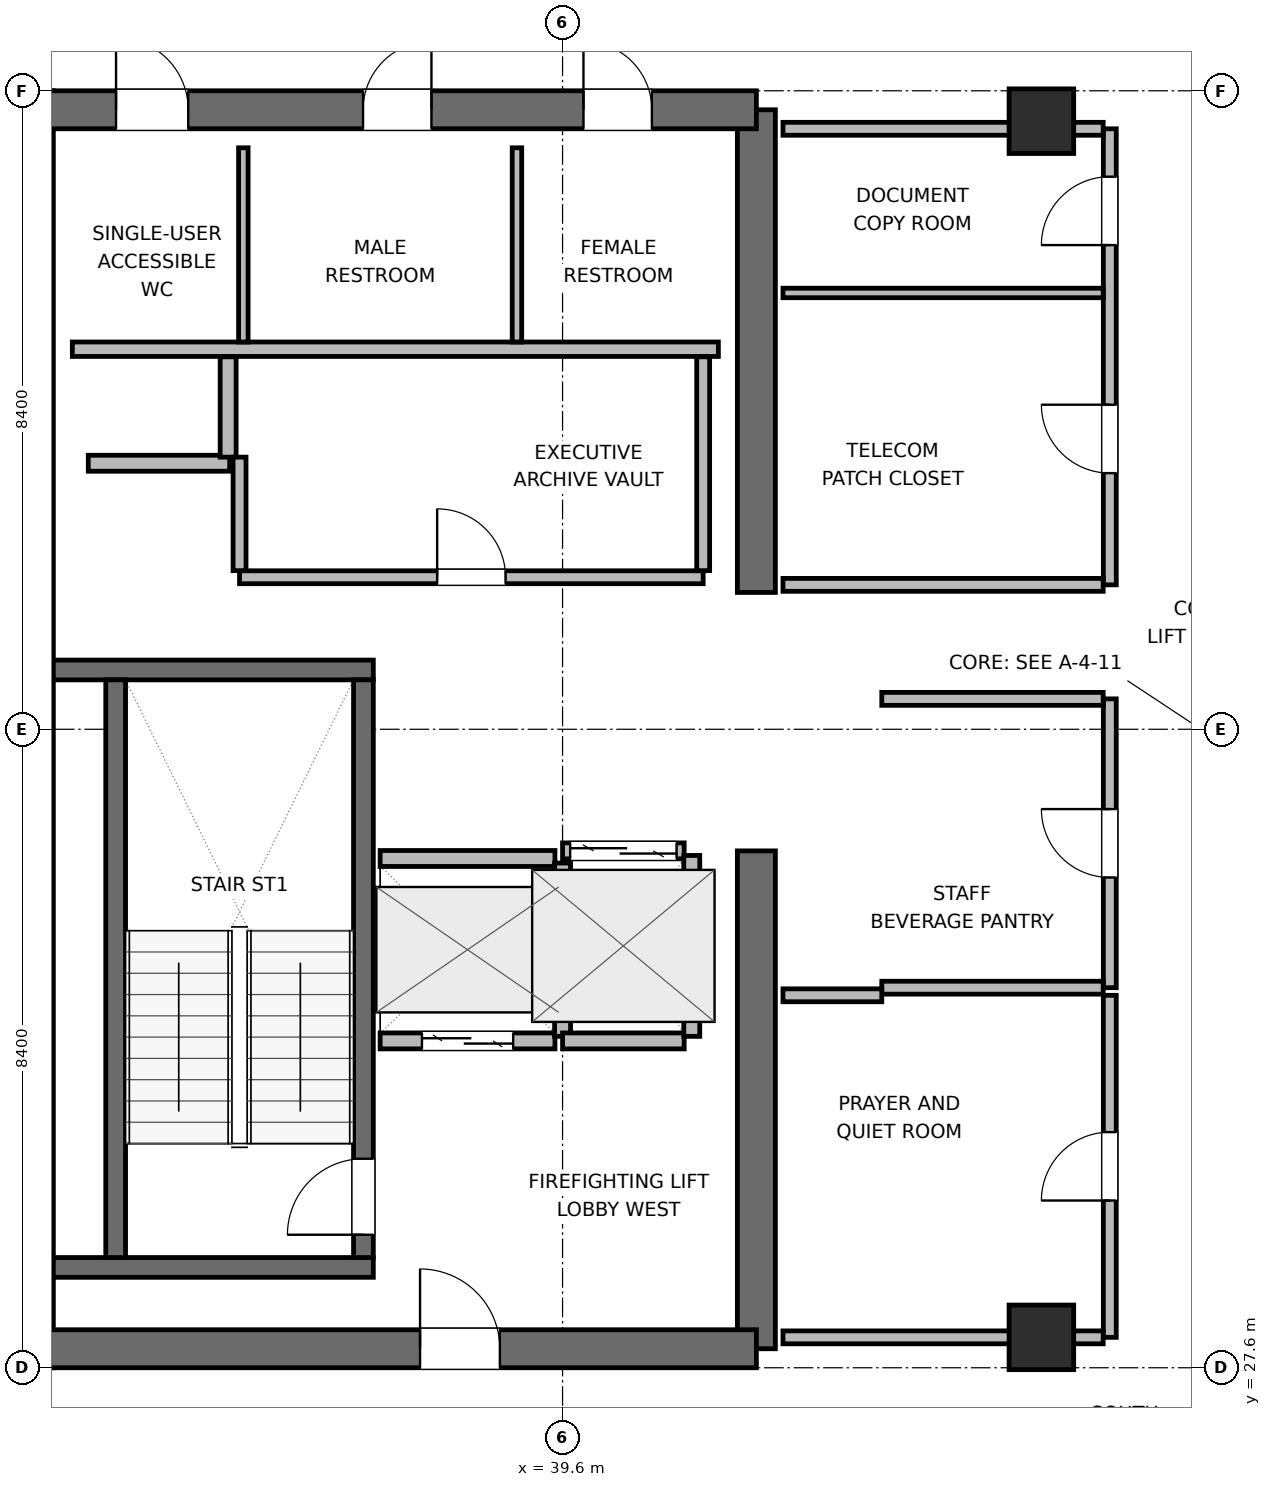
"""IFC4 building model, lengths in metres.
Left out: names, types, materials, properties, quantities, classifications, styles, units other than length and angle.
Written with IfcOpenShell. Run it as: python <this file> out.ifc"""

import sys

from ifc_helpers import new_model, si_unit, direction, frame, frame_2d, origin, origin_2d, place, context, subcontext, project, spatial, rectangle, extrude, element, fill, save


model = new_model("IFC4")
c1 = context("Model", 3, precision=1e-05, world=origin(), true_north=direction((0.0, 1.0)))
c2 = subcontext(c1, "Body", "Model", "MODEL_VIEW")
j1 = project(units=[si_unit("LENGTHUNIT", "METRE"), si_unit("PLANEANGLEUNIT", "RADIAN")], contexts=[c1])
p1 = place(None, origin())
s1 = spatial("IfcSite", under=j1, at=p1, CompositionType="ELEMENT")
p2 = place(p1, origin())
s2 = spatial("IfcBuilding", under=s1, at=p2, CompositionType="ELEMENT")
p3 = place(p2, frame((0.0, 0.0, 314.1)))
s3 = spatial("IfcBuildingStorey", under=s2, at=p3, CompositionType="ELEMENT", Elevation=314.1)
p4 = place(p3, frame((32.65, 27.6, 0.0), z_axis=(0.0, 0.0, 1.0), x_axis=(0.0, 1.0, 0.0)))
e1 = element("IfcWall", 1, at=p4, inside=s3, PredefinedType="SHEAR", context=c2, shape_type="SweptSolid", body=[
    extrude(rectangle(XDim=16.8, YDim=0.5, at=frame_2d((8.4, 0.0))), origin(), (0.0, 0.0, 1.0), 3.9),
])
p5 = place(p3, frame((42.15, 27.85, 0.0), z_axis=(0.0, 0.0, 1.0), x_axis=(0.0, 1.0, 0.0)))
e2 = element("IfcWall", 2, at=p5, inside=s3, PredefinedType="SHEAR", context=c2, shape_type="SweptSolid", body=[
    extrude(rectangle(XDim=6.55, YDim=0.5, at=frame_2d((3.275, 0.0))), origin(), (0.0, 0.0, 1.0), 3.9),
])
p6 = place(p3, frame((42.15, 37.8, 0.0), z_axis=(0.0, 0.0, 1.0), x_axis=(0.0, 1.0, 0.0)))
e3 = element("IfcWall", 3, at=p6, inside=s3, PredefinedType="SHEAR", context=c2, shape_type="SweptSolid", body=[
    extrude(rectangle(XDim=6.35, YDim=0.5, at=frame_2d((3.175, 0.0))), origin(), (0.0, 0.0, 1.0), 3.9),
])
p7 = place(p3, frame((32.65, 27.85, 0.0), z_axis=(0.0, 0.0, 1.0), x_axis=(1.0, 0.0, 0.0)))
e4 = element("IfcWall", 4, at=p7, inside=s3, PredefinedType="SHEAR", context=c2, shape_type="SweptSolid", body=[
    extrude(rectangle(XDim=9.5, YDim=0.5, at=frame_2d((4.75, 0.0))), origin(), (0.0, 0.0, 1.0), 3.9),
])
p8 = place(p7, frame((5.075, 0.0, 0.0)))
e5 = element("IfcOpeningElement", 5, at=p8, cuts=e4, PredefinedType="OPENING", context=c2, shape_type="SweptSolid", body=[
    extrude(rectangle(XDim=1.05, YDim=2.04, at=frame_2d((0.525, 1.02))), frame((0.0, 0.26, 0.0), z_axis=(0.0, -1.0, 0.0), x_axis=(1.0, 0.0, 0.0)), (0.0, 0.0, 1.0), 0.52),
])
p9 = place(p3, frame((32.65, 44.15, 0.0), z_axis=(0.0, 0.0, 1.0), x_axis=(1.0, 0.0, 0.0)))
e6 = element("IfcWall", 6, at=p9, inside=s3, PredefinedType="SHEAR", context=c2, shape_type="SweptSolid", body=[
    extrude(rectangle(XDim=9.5, YDim=0.5, at=frame_2d((4.75, 0.0))), origin(), (0.0, 0.0, 1.0), 3.9),
])
p10 = place(p9, frame((1.075, 0.0, 0.0)))
e7 = element("IfcOpeningElement", 7, at=p10, cuts=e6, PredefinedType="OPENING", context=c2, shape_type="SweptSolid", body=[
    extrude(rectangle(XDim=0.95, YDim=2.04, at=frame_2d((0.475, 1.02))), frame((0.0, 0.26, 0.0), z_axis=(0.0, -1.0, 0.0), x_axis=(1.0, 0.0, 0.0)), (0.0, 0.0, 1.0), 0.52),
])
p11 = place(p9, frame((4.325, 0.0, 0.0)))
e8 = element("IfcOpeningElement", 8, at=p11, cuts=e6, PredefinedType="OPENING", context=c2, shape_type="SweptSolid", body=[
    extrude(rectangle(XDim=0.9, YDim=2.02, at=frame_2d((0.45, 1.01))), frame((0.0, 0.26, 0.0), z_axis=(0.0, -1.0, 0.0), x_axis=(1.0, 0.0, 0.0)), (0.0, 0.0, 1.0), 0.52),
])
p12 = place(p9, frame((7.225, 0.0, 0.0)))
e9 = element("IfcOpeningElement", 9, at=p12, cuts=e6, PredefinedType="OPENING", context=c2, shape_type="SweptSolid", body=[
    extrude(rectangle(XDim=0.9, YDim=2.02, at=frame_2d((0.45, 1.01))), frame((0.0, 0.26, 0.0), z_axis=(0.0, -1.0, 0.0), x_axis=(1.0, 0.0, 0.0)), (0.0, 0.0, 1.0), 0.52),
])
for number, where, z_axis, x_axis in (
    (10, (32.9, 28.92, 0.0), (0.0, 0.0, 1.0), (1.0, 0.0, 0.0)),
    (11, (32.9, 36.78, 0.0), (0.0, 0.0, 1.0), (1.0, 0.0, 0.0)),
):
    element("IfcWall", number, at=place(p3, frame(where, z_axis=z_axis, x_axis=x_axis)), inside=s3, PredefinedType="SHEAR", context=c2, shape_type="SweptSolid", body=[
        extrude(rectangle(XDim=4.21, YDim=0.26, at=frame_2d((2.105, 0.0))), origin(), (0.0, 0.0, 1.0), 3.9),
    ])
p13 = place(p3, frame((33.72, 29.05, 0.0), z_axis=(0.0, 0.0, 1.0), x_axis=(0.0, 1.0, 0.0)))
e12 = element("IfcWall", 12, at=p13, inside=s3, PredefinedType="SHEAR", context=c2, shape_type="SweptSolid", body=[
    extrude(rectangle(XDim=7.6, YDim=0.26, at=frame_2d((3.8, 0.0))), origin(), (0.0, 0.0, 1.0), 3.9),
])
p14 = place(p3, frame((36.98, 29.05, 0.0), z_axis=(0.0, 0.0, 1.0), x_axis=(0.0, 1.0, 0.0)))
e13 = element("IfcWall", 13, at=p14, inside=s3, PredefinedType="SHEAR", context=c2, shape_type="SweptSolid", body=[
    extrude(rectangle(XDim=7.6, YDim=0.26, at=frame_2d((3.8, 0.0))), origin(), (0.0, 0.0, 1.0), 3.9),
])
p15 = place(p14, frame((0.3, 0.0, 0.0)))
e14 = element("IfcOpeningElement", 14, at=p15, cuts=e13, PredefinedType="OPENING", context=c2, shape_type="SweptSolid", body=[
    extrude(rectangle(XDim=1.0, YDim=2.04, at=frame_2d((0.5, 1.02))), frame((0.0, 0.14, 0.0), z_axis=(0.0, -1.0, 0.0), x_axis=(1.0, 0.0, 0.0)), (0.0, 0.0, 1.0), 0.28),
])
for number, where, z_axis, x_axis in (
    (15, (45.9, 28.0, 0.0), (0.0, 0.0, 1.0), (1.0, 0.0, 0.0)),
    (16, (45.9, 44.0, 0.0), (0.0, 0.0, 1.0), (1.0, 0.0, 0.0)),
):
    element("IfcColumn", number, at=place(p3, frame(where, z_axis=z_axis, x_axis=x_axis)), inside=s3, PredefinedType="COLUMN", context=c2, shape_type="SweptSolid", body=[
        extrude(rectangle(XDim=0.85, YDim=0.85, at=origin_2d()), origin(), (0.0, 0.0, 1.0), 3.9),
    ])
p16 = place(p3, frame((33.15, 41.0, 0.0), z_axis=(0.0, 0.0, 1.0), x_axis=(1.0, 0.0, 0.0)))
e17 = element("IfcWall", 17, at=p16, inside=s3, PredefinedType="PLUMBINGWALL", context=c2, shape_type="SweptSolid", body=[
    extrude(rectangle(XDim=8.5, YDim=0.19, at=frame_2d((4.25, 0.0))), origin(), (0.0, 0.0, 1.0), 3.68),
])
for number, where, z_axis, x_axis in (
    (18, (35.4, 41.095, 0.0), (0.0, 0.0, 1.0), (0.0, 1.0, 0.0)),
    (19, (39.0, 41.095, 0.0), (0.0, 0.0, 1.0), (0.0, 1.0, 0.0)),
):
    element("IfcWall", number, at=place(p3, frame(where, z_axis=z_axis, x_axis=x_axis)), inside=s3, PredefinedType="PARTITIONING", context=c2, shape_type="SweptSolid", body=[
        extrude(rectangle(XDim=2.555, YDim=0.125, at=frame_2d((1.277, 0.0))), origin(), (0.0, 0.0, 1.0), 3.68),
    ])
p17 = place(p3, frame((33.36, 39.5, 0.0), z_axis=(0.0, 0.0, 1.0), x_axis=(1.0, 0.0, 0.0)))
e20 = element("IfcWall", 20, at=p17, inside=s3, PredefinedType="PARTITIONING", context=c2, shape_type="SweptSolid", body=[
    extrude(rectangle(XDim=1.86, YDim=0.21, at=frame_2d((0.93, 0.0))), origin(), (0.0, 0.0, 1.0), 3.68),
])
p18 = place(p3, frame((35.2, 39.58, 0.0), z_axis=(0.0, 0.0, 1.0), x_axis=(0.0, 1.0, 0.0)))
e21 = element("IfcWall", 21, at=p18, inside=s3, PredefinedType="PARTITIONING", context=c2, shape_type="SweptSolid", body=[
    extrude(rectangle(XDim=1.32, YDim=0.21, at=frame_2d((0.66, 0.0))), origin(), (0.0, 0.0, 1.0), 3.68),
])
p19 = place(p3, frame((37.2, 31.9, 0.0), z_axis=(0.0, 0.0, 1.0), x_axis=(1.0, 0.0, 0.0)))
e22 = element("IfcWall", 22, at=p19, inside=s3, PredefinedType="PARTITIONING", context=c2, shape_type="SweptSolid", body=[
    extrude(rectangle(XDim=2.3, YDim=0.21, at=frame_2d((1.15, 0.0))), origin(), (0.0, 0.0, 1.0), 3.68),
])
p20 = place(p19, frame((0.55, 0.0, 0.0)))
e23 = element("IfcOpeningElement", 23, at=p20, cuts=e22, PredefinedType="OPENING", context=c2, shape_type="SweptSolid", body=[
    extrude(rectangle(XDim=1.2, YDim=2.04, at=frame_2d((0.6, 1.02))), frame((0.0, 0.115, 0.0), z_axis=(0.0, -1.0, 0.0), x_axis=(1.0, 0.0, 0.0)), (0.0, 0.0, 1.0), 0.23),
])
p21 = place(p3, frame((37.2, 34.3, 0.0), z_axis=(0.0, 0.0, 1.0), x_axis=(1.0, 0.0, 0.0)))
e24 = element("IfcWall", 24, at=p21, inside=s3, PredefinedType="PARTITIONING", context=c2, shape_type="SweptSolid", body=[
    extrude(rectangle(XDim=2.3, YDim=0.21, at=frame_2d((1.15, 0.0))), origin(), (0.0, 0.0, 1.0), 3.68),
])
p22 = place(p3, frame((39.6, 31.96, 0.0), z_axis=(0.0, 0.0, 1.0), x_axis=(0.0, 1.0, 0.0)))
e25 = element("IfcWall", 25, at=p22, inside=s3, PredefinedType="PARTITIONING", context=c2, shape_type="SweptSolid", body=[
    extrude(rectangle(XDim=2.28, YDim=0.21, at=frame_2d((1.14, 0.0))), origin(), (0.0, 0.0, 1.0), 3.68),
])
p23 = place(p3, frame((39.6, 34.4, 0.0), z_axis=(0.0, 0.0, 1.0), x_axis=(1.0, 0.0, 0.0)))
e26 = element("IfcWall", 26, at=p23, inside=s3, PredefinedType="PARTITIONING", context=c2, shape_type="SweptSolid", body=[
    extrude(rectangle(XDim=1.6, YDim=0.21, at=frame_2d((0.8, 0.0))), origin(), (0.0, 0.0, 1.0), 3.68),
])
p24 = place(p23, frame((0.1, 0.0, 0.0)))
e27 = element("IfcOpeningElement", 27, at=p24, cuts=e26, PredefinedType="OPENING", context=c2, shape_type="SweptSolid", body=[
    extrude(rectangle(XDim=1.4, YDim=2.06, at=frame_2d((0.7, 1.03))), frame((0.0, 0.115, 0.0), z_axis=(0.0, -1.0, 0.0), x_axis=(1.0, 0.0, 0.0)), (0.0, 0.0, 1.0), 0.23),
])
p25 = place(p3, frame((39.6, 31.9, 0.0), z_axis=(0.0, 0.0, 1.0), x_axis=(1.0, 0.0, 0.0)))
e28 = element("IfcWall", 28, at=p25, inside=s3, PredefinedType="PARTITIONING", context=c2, shape_type="SweptSolid", body=[
    extrude(rectangle(XDim=1.6, YDim=0.21, at=frame_2d((0.8, 0.0))), origin(), (0.0, 0.0, 1.0), 3.68),
])
p26 = place(p3, frame((41.3, 31.96, 0.0), z_axis=(0.0, 0.0, 1.0), x_axis=(0.0, 1.0, 0.0)))
e29 = element("IfcWall", 29, at=p26, inside=s3, PredefinedType="PARTITIONING", context=c2, shape_type="SweptSolid", body=[
    extrude(rectangle(XDim=2.38, YDim=0.21, at=frame_2d((1.19, 0.0))), origin(), (0.0, 0.0, 1.0), 3.68),
])
p27 = place(p3, frame((35.35, 38.0, 0.0), z_axis=(0.0, 0.0, 1.0), x_axis=(1.0, 0.0, 0.0)))
e30 = element("IfcWall", 30, at=p27, inside=s3, PredefinedType="PARTITIONING", context=c2, shape_type="SweptSolid", body=[
    extrude(rectangle(XDim=6.1, YDim=0.17, at=frame_2d((3.05, 0.0))), origin(), (0.0, 0.0, 1.0), 3.68),
])
p28 = place(p27, frame((2.6, 0.0, 0.0)))
e31 = element("IfcOpeningElement", 31, at=p28, cuts=e30, PredefinedType="OPENING", context=c2, shape_type="SweptSolid", body=[
    extrude(rectangle(XDim=0.9, YDim=2.02, at=frame_2d((0.45, 1.01))), frame((0.0, 0.095, 0.0), z_axis=(0.0, -1.0, 0.0), x_axis=(1.0, 0.0, 0.0)), (0.0, 0.0, 1.0), 0.19),
])
p29 = place(p3, frame((35.35, 38.087, 0.0), z_axis=(0.0, 0.0, 1.0), x_axis=(0.0, 1.0, 0.0)))
e32 = element("IfcWall", 32, at=p29, inside=s3, PredefinedType="PARTITIONING", context=c2, shape_type="SweptSolid", body=[
    extrude(rectangle(XDim=1.493, YDim=0.17, at=frame_2d((0.747, 0.0))), origin(), (0.0, 0.0, 1.0), 3.68),
])
p30 = place(p3, frame((41.45, 38.087, 0.0), z_axis=(0.0, 0.0, 1.0), x_axis=(0.0, 1.0, 0.0)))
e33 = element("IfcWall", 33, at=p30, inside=s3, PredefinedType="PARTITIONING", context=c2, shape_type="SweptSolid", body=[
    extrude(rectangle(XDim=2.813, YDim=0.17, at=frame_2d((1.406, 0.0))), origin(), (0.0, 0.0, 1.0), 3.68),
])
p31 = place(p3, frame((46.8, 32.6, 0.0), z_axis=(0.0, 0.0, 1.0), x_axis=(0.0, 1.0, 0.0)))
e34 = element("IfcWall", 34, at=p31, inside=s3, PredefinedType="PARTITIONING", context=c2, shape_type="SweptSolid", body=[
    extrude(rectangle(XDim=3.8, YDim=0.17, at=frame_2d((1.9, 0.0))), origin(), (0.0, 0.0, 1.0), 3.68),
])
p32 = place(p31, frame((1.45, 0.0, 0.0)))
e35 = element("IfcOpeningElement", 35, at=p32, cuts=e34, PredefinedType="OPENING", context=c2, shape_type="SweptSolid", body=[
    extrude(rectangle(XDim=0.9, YDim=2.02, at=frame_2d((0.45, 1.01))), frame((0.0, 0.095, 0.0), z_axis=(0.0, -1.0, 0.0), x_axis=(1.0, 0.0, 0.0)), (0.0, 0.0, 1.0), 0.19),
])
for number, where, z_axis, x_axis in (
    (36, (43.8, 32.6, 0.0), (0.0, 0.0, 1.0), (1.0, 0.0, 0.0)),
    (37, (43.8, 36.4, 0.0), (0.0, 0.0, 1.0), (1.0, 0.0, 0.0)),
):
    element("IfcWall", number, at=place(p3, frame(where, z_axis=z_axis, x_axis=x_axis)), inside=s3, PredefinedType="PARTITIONING", context=c2, shape_type="SweptSolid", body=[
        extrude(rectangle(XDim=2.913, YDim=0.17, at=frame_2d((1.457, 0.0))), origin(), (0.0, 0.0, 1.0), 3.68),
    ])
p33 = place(p3, frame((46.8, 28.0, 0.0), z_axis=(0.0, 0.0, 1.0), x_axis=(0.0, 1.0, 0.0)))
e38 = element("IfcWall", 38, at=p33, inside=s3, PredefinedType="PARTITIONING", context=c2, shape_type="SweptSolid", body=[
    extrude(rectangle(XDim=4.5, YDim=0.17, at=frame_2d((2.25, 0.0))), origin(), (0.0, 0.0, 1.0), 3.68),
])
p34 = place(p33, frame((1.8, 0.0, 0.0)))
e39 = element("IfcOpeningElement", 39, at=p34, cuts=e38, PredefinedType="OPENING", context=c2, shape_type="SweptSolid", body=[
    extrude(rectangle(XDim=0.9, YDim=2.02, at=frame_2d((0.45, 1.01))), frame((0.0, 0.095, 0.0), z_axis=(0.0, -1.0, 0.0), x_axis=(1.0, 0.0, 0.0)), (0.0, 0.0, 1.0), 0.19),
])
p35 = place(p3, frame((42.5, 28.0, 0.0), z_axis=(0.0, 0.0, 1.0), x_axis=(1.0, 0.0, 0.0)))
e40 = element("IfcWall", 40, at=p35, inside=s3, PredefinedType="PARTITIONING", context=c2, shape_type="SweptSolid", body=[
    extrude(rectangle(XDim=4.213, YDim=0.17, at=frame_2d((2.106, 0.0))), origin(), (0.0, 0.0, 1.0), 2.765),
])
p36 = place(p3, frame((42.5, 32.5, 0.0), z_axis=(0.0, 0.0, 1.0), x_axis=(1.0, 0.0, 0.0)))
e41 = element("IfcWall", 41, at=p36, inside=s3, PredefinedType="PARTITIONING", context=c2, shape_type="SweptSolid", body=[
    extrude(rectangle(XDim=1.3, YDim=0.17, at=frame_2d((0.65, 0.0))), origin(), (0.0, 0.0, 1.0), 3.68),
])
p37 = place(p3, frame((46.8, 37.9, 0.0), z_axis=(0.0, 0.0, 1.0), x_axis=(0.0, 1.0, 0.0)))
e42 = element("IfcWall", 42, at=p37, inside=s3, PredefinedType="PARTITIONING", context=c2, shape_type="SweptSolid", body=[
    extrude(rectangle(XDim=6.0, YDim=0.17, at=frame_2d((3.0, 0.0))), origin(), (0.0, 0.0, 1.0), 3.68),
])
p38 = place(p37, frame((1.47, 0.0, 0.0)))
e43 = element("IfcOpeningElement", 43, at=p38, cuts=e42, PredefinedType="OPENING", context=c2, shape_type="SweptSolid", body=[
    extrude(rectangle(XDim=0.9, YDim=2.02, at=frame_2d((0.45, 1.01))), frame((0.0, 0.095, 0.0), z_axis=(0.0, -1.0, 0.0), x_axis=(1.0, 0.0, 0.0)), (0.0, 0.0, 1.0), 0.19),
])
p39 = place(p37, frame((4.47, 0.0, 0.0)))
e44 = element("IfcOpeningElement", 44, at=p39, cuts=e42, PredefinedType="OPENING", context=c2, shape_type="SweptSolid", body=[
    extrude(rectangle(XDim=0.9, YDim=2.02, at=frame_2d((0.45, 1.01))), frame((0.0, 0.095, 0.0), z_axis=(0.0, -1.0, 0.0), x_axis=(1.0, 0.0, 0.0)), (0.0, 0.0, 1.0), 0.19),
])
p40 = place(p3, frame((42.5, 37.9, 0.0), z_axis=(0.0, 0.0, 1.0), x_axis=(1.0, 0.0, 0.0)))
e45 = element("IfcWall", 45, at=p40, inside=s3, PredefinedType="PARTITIONING", context=c2, shape_type="SweptSolid", body=[
    extrude(rectangle(XDim=4.213, YDim=0.17, at=frame_2d((2.106, 0.0))), origin(), (0.0, 0.0, 1.0), 3.68),
])
p41 = place(p3, frame((42.5, 43.9, 0.0), z_axis=(0.0, 0.0, 1.0), x_axis=(1.0, 0.0, 0.0)))
e46 = element("IfcWall", 46, at=p41, inside=s3, PredefinedType="PARTITIONING", context=c2, shape_type="SweptSolid", body=[
    extrude(rectangle(XDim=4.213, YDim=0.17, at=frame_2d((2.106, 0.0))), origin(), (0.0, 0.0, 1.0), 2.765),
])
p42 = place(p3, frame((42.5, 41.74, 0.0), z_axis=(0.0, 0.0, 1.0), x_axis=(1.0, 0.0, 0.0)))
e47 = element("IfcWall", 47, at=p42, inside=s3, PredefinedType="PARTITIONING", context=c2, shape_type="SweptSolid", body=[
    extrude(rectangle(XDim=4.213, YDim=0.125, at=frame_2d((2.106, 0.0))), origin(), (0.0, 0.0, 1.0), 3.68),
])
p43 = place(p15, origin())
e48 = element("IfcDoor", 48, at=p43, inside=s3, OperationType="SINGLE_SWING_LEFT", PredefinedType="DOOR", context=c2, shape_type="SweptSolid", body=[
    extrude(rectangle(XDim=1.0, YDim=2.04, at=frame_2d((0.5, 1.02))), frame((0.0, 0.025, 0.0), z_axis=(0.0, -1.0, 0.0), x_axis=(1.0, 0.0, 0.0)), (0.0, 0.0, 1.0), 0.05),
])
fill(e14, e48)
p44 = place(p20, origin())
e49 = element("IfcDoor", 49, at=p44, inside=s3, OperationType="DOUBLE_DOOR_SLIDING", PredefinedType="DOOR", context=c2, shape_type="SweptSolid", body=[
    extrude(rectangle(XDim=1.2, YDim=2.04, at=frame_2d((0.6, 1.02))), frame((0.0, 0.025, 0.0), z_axis=(0.0, -1.0, 0.0), x_axis=(1.0, 0.0, 0.0)), (0.0, 0.0, 1.0), 0.05),
])
fill(e23, e49)
p45 = place(p24, origin())
e50 = element("IfcDoor", 50, at=p45, inside=s3, OperationType="DOUBLE_DOOR_SLIDING", PredefinedType="DOOR", context=c2, shape_type="SweptSolid", body=[
    extrude(rectangle(XDim=1.4, YDim=2.06, at=frame_2d((0.7, 1.03))), frame((0.0, 0.025, 0.0), z_axis=(0.0, -1.0, 0.0), x_axis=(1.0, 0.0, 0.0)), (0.0, 0.0, 1.0), 0.05),
])
fill(e27, e50)
p46 = place(p8, origin())
e51 = element("IfcDoor", 51, at=p46, inside=s3, OperationType="SINGLE_SWING_LEFT", PredefinedType="DOOR", context=c2, shape_type="SweptSolid", body=[
    extrude(rectangle(XDim=1.05, YDim=2.04, at=frame_2d((0.525, 1.02))), frame((0.0, 0.025, 0.0), z_axis=(0.0, -1.0, 0.0), x_axis=(1.0, 0.0, 0.0)), (0.0, 0.0, 1.0), 0.05),
])
fill(e5, e51)
p47 = place(p10, origin())
e52 = element("IfcDoor", 52, at=p47, inside=s3, OperationType="SINGLE_SWING_LEFT", PredefinedType="DOOR", context=c2, shape_type="SweptSolid", body=[
    extrude(rectangle(XDim=0.95, YDim=2.04, at=frame_2d((0.475, 1.02))), frame((0.0, 0.025, 0.0), z_axis=(0.0, -1.0, 0.0), x_axis=(1.0, 0.0, 0.0)), (0.0, 0.0, 1.0), 0.05),
])
fill(e7, e52)
p48 = place(p11, origin())
e53 = element("IfcDoor", 53, at=p48, inside=s3, OperationType="SINGLE_SWING_RIGHT", PredefinedType="DOOR", context=c2, shape_type="SweptSolid", body=[
    extrude(rectangle(XDim=0.9, YDim=2.02, at=frame_2d((0.45, 1.01))), frame((0.0, 0.025, 0.0), z_axis=(0.0, -1.0, 0.0), x_axis=(1.0, 0.0, 0.0)), (0.0, 0.0, 1.0), 0.05),
])
fill(e8, e53)
p49 = place(p12, origin())
e54 = element("IfcDoor", 54, at=p49, inside=s3, OperationType="SINGLE_SWING_LEFT", PredefinedType="DOOR", context=c2, shape_type="SweptSolid", body=[
    extrude(rectangle(XDim=0.9, YDim=2.02, at=frame_2d((0.45, 1.01))), frame((0.0, 0.025, 0.0), z_axis=(0.0, -1.0, 0.0), x_axis=(1.0, 0.0, 0.0)), (0.0, 0.0, 1.0), 0.05),
])
fill(e9, e54)
p50 = place(p28, origin())
e55 = element("IfcDoor", 55, at=p50, inside=s3, OperationType="SINGLE_SWING_LEFT", PredefinedType="DOOR", context=c2, shape_type="SweptSolid", body=[
    extrude(rectangle(XDim=0.9, YDim=2.02, at=frame_2d((0.45, 1.01))), frame((0.0, 0.025, 0.0), z_axis=(0.0, -1.0, 0.0), x_axis=(1.0, 0.0, 0.0)), (0.0, 0.0, 1.0), 0.05),
])
fill(e31, e55)
p51 = place(p32, origin())
e56 = element("IfcDoor", 56, at=p51, inside=s3, OperationType="SINGLE_SWING_RIGHT", PredefinedType="DOOR", context=c2, shape_type="SweptSolid", body=[
    extrude(rectangle(XDim=0.9, YDim=2.02, at=frame_2d((0.45, 1.01))), frame((0.0, 0.025, 0.0), z_axis=(0.0, -1.0, 0.0), x_axis=(1.0, 0.0, 0.0)), (0.0, 0.0, 1.0), 0.05),
])
fill(e35, e56)
p52 = place(p34, origin())
e57 = element("IfcDoor", 57, at=p52, inside=s3, OperationType="SINGLE_SWING_LEFT", PredefinedType="DOOR", context=c2, shape_type="SweptSolid", body=[
    extrude(rectangle(XDim=0.9, YDim=2.02, at=frame_2d((0.45, 1.01))), frame((0.0, 0.025, 0.0), z_axis=(0.0, -1.0, 0.0), x_axis=(1.0, 0.0, 0.0)), (0.0, 0.0, 1.0), 0.05),
])
fill(e39, e57)
p53 = place(p38, origin())
e58 = element("IfcDoor", 58, at=p53, inside=s3, OperationType="SINGLE_SWING_RIGHT", PredefinedType="DOOR", context=c2, shape_type="SweptSolid", body=[
    extrude(rectangle(XDim=0.9, YDim=2.02, at=frame_2d((0.45, 1.01))), frame((0.0, 0.025, 0.0), z_axis=(0.0, -1.0, 0.0), x_axis=(1.0, 0.0, 0.0)), (0.0, 0.0, 1.0), 0.05),
])
fill(e43, e58)
p54 = place(p39, origin())
e59 = element("IfcDoor", 59, at=p54, inside=s3, OperationType="SINGLE_SWING_LEFT", PredefinedType="DOOR", context=c2, shape_type="SweptSolid", body=[
    extrude(rectangle(XDim=0.9, YDim=2.02, at=frame_2d((0.45, 1.01))), frame((0.0, 0.025, 0.0), z_axis=(0.0, -1.0, 0.0), x_axis=(1.0, 0.0, 0.0)), (0.0, 0.0, 1.0), 0.05),
])
fill(e44, e59)
save(model, sys.argv[1])
